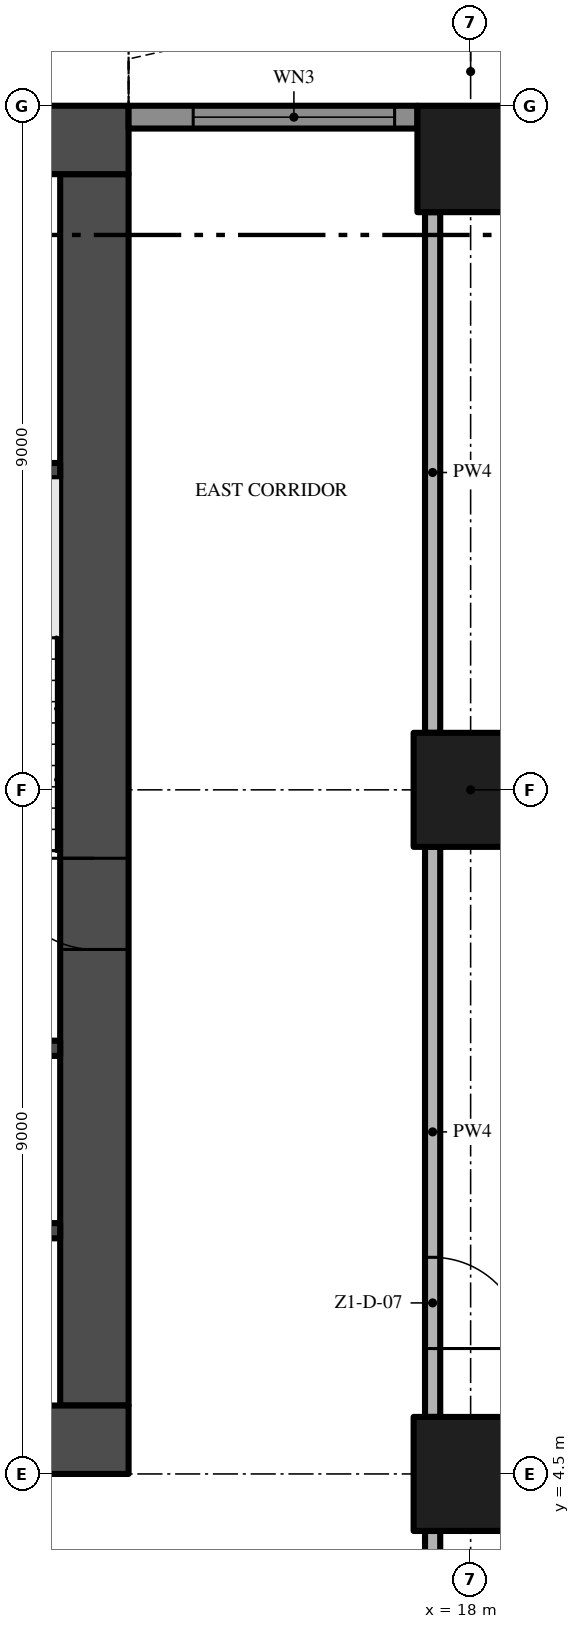
"""IFC4 building model, lengths in metres.
Left out: names, types, materials, properties, quantities, classifications, styles, units other than length and angle.
Written with IfcOpenShell. Run it as: python <this file> out.ifc"""

import sys

from ifc_helpers import new_model, si_unit, direction, frame, frame_2d, origin, origin_2d, place, context, subcontext, project, spatial, polyline, rectangle, outline, extrude, element, fill, save


model = new_model("IFC4")
c1 = context("Model", 3, precision=1e-05, world=origin(), true_north=direction((0.0, 1.0)))
c2 = subcontext(c1, "Body", "Model", "MODEL_VIEW")
j1 = project(units=[si_unit("LENGTHUNIT", "METRE"), si_unit("PLANEANGLEUNIT", "RADIAN")], contexts=[c1])
p1 = place(None, origin())
s1 = spatial("IfcSite", under=j1, at=p1, CompositionType="ELEMENT")
p2 = place(p1, origin())
s2 = spatial("IfcBuilding", under=s1, at=p2, CompositionType="ELEMENT")
p3 = place(p2, frame((0.0, 0.0, 49.2)))
s3 = spatial("IfcBuildingStorey", under=s2, at=p3, CompositionType="ELEMENT", Elevation=49.2)
p4 = place(p3, frame((-13.5, 4.95, -0.3), z_axis=(0.0, 0.0, 1.0), x_axis=(1.0, 0.0, 0.0)))
e1 = element("IfcWall", 1, at=p4, inside=s3, PredefinedType="SHEAR", context=c2, shape_type="SweptSolid", body=[
    extrude(rectangle(XDim=27.0, YDim=0.9, at=frame_2d((13.5, 0.0))), origin(), (0.0, 0.0, 1.0), 3.8),
])
p5 = place(p4, frame((12.0, 0.0, 0.3)))
e2 = element("IfcOpeningElement", 2, at=p5, cuts=e1, PredefinedType="OPENING", context=c2, shape_type="SweptSolid", body=[
    extrude(rectangle(XDim=3.0, YDim=2.4, at=frame_2d((1.5, 1.2))), frame((0.0, 0.46, 0.0), z_axis=(0.0, -1.0, 0.0), x_axis=(1.0, 0.0, 0.0)), (0.0, 0.0, 1.0), 0.92),
])
p6 = place(p4, frame((4.9, 0.0, 0.3)))
e3 = element("IfcOpeningElement", 3, at=p6, cuts=e1, PredefinedType="OPENING", context=c2, shape_type="SweptSolid", body=[
    extrude(rectangle(XDim=1.2, YDim=2.2, at=frame_2d((0.6, 1.1))), frame((0.0, 0.46, 0.0), z_axis=(0.0, -1.0, 0.0), x_axis=(1.0, 0.0, 0.0)), (0.0, 0.0, 1.0), 0.92),
])
p7 = place(p4, frame((20.75, 0.0, 0.3)))
e4 = element("IfcOpeningElement", 4, at=p7, cuts=e1, PredefinedType="OPENING", context=c2, shape_type="SweptSolid", body=[
    extrude(rectangle(XDim=1.5, YDim=2.2, at=frame_2d((0.75, 1.1))), frame((0.0, 0.46, 0.0), z_axis=(0.0, -1.0, 0.0), x_axis=(1.0, 0.0, 0.0)), (0.0, 0.0, 1.0), 0.92),
])
p8 = place(p4, frame((17.4, 0.0, 0.3)))
e5 = element("IfcOpeningElement", 5, at=p8, cuts=e1, PredefinedType="OPENING", context=c2, shape_type="SweptSolid", body=[
    extrude(rectangle(XDim=1.2, YDim=2.2, at=frame_2d((0.6, 1.1))), frame((0.0, 0.46, 0.0), z_axis=(0.0, -1.0, 0.0), x_axis=(1.0, 0.0, 0.0)), (0.0, 0.0, 1.0), 0.92),
])
p9 = place(p3, frame((13.05, 5.4, -0.3), z_axis=(0.0, 0.0, 1.0), x_axis=(0.0, 1.0, 0.0)))
e6 = element("IfcWall", 6, at=p9, inside=s3, PredefinedType="SHEAR", context=c2, shape_type="SweptSolid", body=[
    extrude(rectangle(XDim=16.2, YDim=0.9, at=frame_2d((8.1, 0.0))), origin(), (0.0, 0.0, 1.0), 3.8),
])
p10 = place(p9, frame((6.0, 0.0, 0.3)))
e7 = element("IfcOpeningElement", 7, at=p10, cuts=e6, PredefinedType="OPENING", context=c2, shape_type="SweptSolid", body=[
    extrude(rectangle(XDim=1.2, YDim=2.2, at=frame_2d((0.6, 1.1))), frame((0.0, 0.46, 0.0), z_axis=(0.0, -1.0, 0.0), x_axis=(1.0, 0.0, 0.0)), (0.0, 0.0, 1.0), 0.92),
])
p11 = place(p3, frame((13.5, 22.05, -0.3), z_axis=(0.0, 0.0, 1.0), x_axis=(-1.0, 0.0, 0.0)))
e8 = element("IfcWall", 8, at=p11, inside=s3, PredefinedType="SHEAR", context=c2, shape_type="SweptSolid", body=[
    extrude(rectangle(XDim=27.0, YDim=0.9, at=frame_2d((13.5, 0.0))), origin(), (0.0, 0.0, 1.0), 3.8),
])
p12 = place(p3, frame((18.0, 13.5, 0.0), z_axis=(0.0, 0.0, 1.0), x_axis=(1.0, 0.0, 0.0)))
e9 = element("IfcColumn", 9, at=p12, inside=s3, PredefinedType="COLUMN", context=c2, shape_type="SweptSolid", body=[
    extrude(rectangle(XDim=1.5, YDim=1.5, at=origin_2d()), origin(), (0.0, 0.0, 1.0), 3.5),
])
p13 = place(p3, frame((18.0, 21.8, 0.0), z_axis=(0.0, 0.0, 1.0), x_axis=(1.0, 0.0, 0.0)))
e10 = element("IfcColumn", 10, at=p13, inside=s3, PredefinedType="COLUMN", context=c2, shape_type="SweptSolid", body=[
    extrude(rectangle(XDim=1.4, YDim=1.4, at=origin_2d()), origin(), (0.0, 0.0, 1.0), 3.5),
])
p14 = place(p3, frame((18.0, 4.5, 0.0), z_axis=(0.0, 0.0, 1.0), x_axis=(1.0, 0.0, 0.0)))
e11 = element("IfcColumn", 11, at=p14, inside=s3, PredefinedType="COLUMN", context=c2, shape_type="SweptSolid", body=[
    extrude(rectangle(XDim=1.5, YDim=1.5, at=origin_2d()), origin(), (0.0, 0.0, 1.0), 3.5),
])
p15 = place(p3, frame((13.5, 22.35, 0.0), z_axis=(0.0, 0.0, 1.0), x_axis=(1.0, 0.0, 0.0)))
e12 = element("IfcWall", 12, at=p15, inside=s3, PredefinedType="SOLIDWALL", context=c2, shape_type="SweptSolid", body=[
    extrude(rectangle(XDim=3.8, YDim=0.3, at=frame_2d((1.9, 0.0))), origin(), (0.0, 0.0, 1.0), 3.5),
])
p16 = place(p15, frame((0.85, 0.0, 0.45)))
e13 = element("IfcOpeningElement", 13, at=p16, cuts=e12, PredefinedType="OPENING", context=c2, shape_type="SweptSolid", body=[
    extrude(rectangle(XDim=2.65, YDim=2.65, at=frame_2d((1.325, 1.325))), frame((0.0, 0.16, 0.0), z_axis=(0.0, -1.0, 0.0), x_axis=(1.0, 0.0, 0.0)), (0.0, 0.0, 1.0), 0.32),
])
p17 = place(p3, origin())
e14 = element("IfcWall", 14, at=p17, inside=s3, PredefinedType="USERDEFINED", context=c2, shape_type="SweptSolid", body=[
    extrude(outline(polyline([(22.5, 25.149), (21.0, 25.485), (20.625, 25.5), (19.5, 25.369), (18.0, 24.845), (16.5, 24.112), (15.0, 23.451), (13.5, 23.115), (13.555, 22.871), (15.079, 23.213), (16.605, 23.885), (18.096, 24.614), (19.556, 25.124), (20.635, 25.249), (20.967, 25.236), (22.445, 24.905), (22.5, 25.149)])), origin(), (0.0, 0.0, 1.0), 0.9),
])
for number, where, z_axis, x_axis in (
    (15, (9.65, 7.7, 0.0), (0.0, 0.0, 1.0), (1.0, 0.0, 0.0)),
    (16, (9.65, 10.1, 0.0), (0.0, 0.0, 1.0), (1.0, 0.0, 0.0)),
    (17, (9.65, 17.7, 0.0), (0.0, 0.0, 1.0), (1.0, 0.0, 0.0)),
):
    element("IfcWall", number, at=place(p3, frame(where, z_axis=z_axis, x_axis=x_axis)), inside=s3, PredefinedType="SHEAR", context=c2, shape_type="SweptSolid", body=[
        extrude(rectangle(XDim=2.95, YDim=0.2, at=frame_2d((1.475, 0.0))), origin(), (0.0, 0.0, 1.0), 3.5),
    ])
p18 = place(p3, frame((17.5, -0.2, 0.0), z_axis=(0.0, 0.0, 1.0), x_axis=(0.0, 1.0, 0.0)))
e18 = element("IfcWall", 18, at=p18, inside=s3, PredefinedType="PARTITIONING", context=c2, shape_type="SweptSolid", body=[
    extrude(rectangle(XDim=3.95, YDim=0.2, at=frame_2d((1.975, 0.0))), origin(), (0.0, 0.0, 1.0), 3.5),
])
p19 = place(p3, frame((17.5, 12.75, 0.0), z_axis=(0.0, 0.0, 1.0), x_axis=(0.0, -1.0, 0.0)))
e19 = element("IfcWall", 19, at=p19, inside=s3, PredefinedType="PARTITIONING", context=c2, shape_type="SweptSolid", body=[
    extrude(rectangle(XDim=7.5, YDim=0.2, at=frame_2d((3.75, 0.0))), origin(), (0.0, 0.0, 1.0), 3.5),
])
p20 = place(p19, frame((5.4, 0.0, 0.0)))
e20 = element("IfcOpeningElement", 20, at=p20, cuts=e19, PredefinedType="OPENING", context=c2, shape_type="SweptSolid", body=[
    extrude(rectangle(XDim=1.2, YDim=2.4, at=frame_2d((0.6, 1.2))), frame((0.0, 0.11, 0.0), z_axis=(0.0, -1.0, 0.0), x_axis=(1.0, 0.0, 0.0)), (0.0, 0.0, 1.0), 0.22),
])
p21 = place(p3, frame((17.5, 14.25, 0.0), z_axis=(0.0, 0.0, 1.0), x_axis=(0.0, 1.0, 0.0)))
e21 = element("IfcWall", 21, at=p21, inside=s3, PredefinedType="PARTITIONING", context=c2, shape_type="SweptSolid", body=[
    extrude(rectangle(XDim=6.85, YDim=0.2, at=frame_2d((3.425, 0.0))), origin(), (0.0, 0.0, 1.0), 3.5),
])
p22 = place(p16, origin())
e22 = element("IfcWindow", 22, at=p22, inside=s3, PartitioningType="SINGLE_PANEL", PredefinedType="WINDOW", context=c2, shape_type="SweptSolid", body=[
    extrude(rectangle(XDim=2.65, YDim=2.65, at=frame_2d((1.325, 1.325))), frame((0.0, 0.03, 0.0), z_axis=(0.0, -1.0, 0.0), x_axis=(1.0, 0.0, 0.0)), (0.0, 0.0, 1.0), 0.06),
])
fill(e13, e22)
p23 = place(p10, frame((1.2, 0.0, 0.0), z_axis=(0.0, 0.0, 1.0), x_axis=(-1.0, 0.0, 0.0)))
e23 = element("IfcDoor", 23, at=p23, inside=s3, OperationType="SINGLE_SWING_LEFT", PredefinedType="DOOR", context=c2, shape_type="SweptSolid", body=[
    extrude(rectangle(XDim=1.2, YDim=2.2, at=frame_2d((0.6, 1.1))), frame((0.0, 0.025, 0.0), z_axis=(0.0, -1.0, 0.0), x_axis=(1.0, 0.0, 0.0)), (0.0, 0.0, 1.0), 0.05),
])
fill(e7, e23)
p24 = place(p20, origin())
e24 = element("IfcDoor", 24, at=p24, inside=s3, OperationType="SINGLE_SWING_RIGHT", PredefinedType="DOOR", context=c2, shape_type="SweptSolid", body=[
    extrude(rectangle(XDim=1.2, YDim=2.4, at=frame_2d((0.6, 1.2))), frame((0.0, 0.025, 0.0), z_axis=(0.0, -1.0, 0.0), x_axis=(1.0, 0.0, 0.0)), (0.0, 0.0, 1.0), 0.05),
])
fill(e20, e24)
save(model, sys.argv[1])
